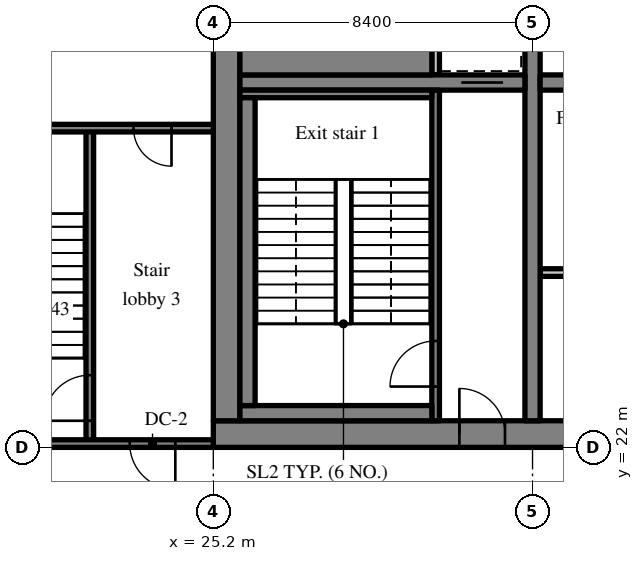
"""IFC4 building model, lengths in metres.
Left out: names, types, materials, properties, quantities, classifications, styles, units other than length and angle.
Written with IfcOpenShell. Run it as: python <this file> out.ifc"""

import sys

from ifc_helpers import new_model, si_unit, direction, frame, frame_2d, origin, place, context, subcontext, project, spatial, rectangle, extrude, source, transform, mapped, element, fill, save


model = new_model("IFC4")
c1 = context("Model", 3, precision=1e-05, world=origin(), true_north=direction((0.0, 1.0)))
c2 = subcontext(c1, "Body", "Model", "MODEL_VIEW")
j1 = project(units=[si_unit("LENGTHUNIT", "METRE"), si_unit("PLANEANGLEUNIT", "RADIAN")], contexts=[c1])
p1 = place(None, origin())
s1 = spatial("IfcSite", under=j1, at=p1, CompositionType="ELEMENT")
p2 = place(p1, origin())
s2 = spatial("IfcBuilding", under=s1, at=p2, CompositionType="ELEMENT")
p3 = place(p2, frame((0.0, 0.0, 178.2)))
s3 = spatial("IfcBuildingStorey", under=s2, at=p3, CompositionType="ELEMENT", Elevation=178.2)
m1 = source(origin(), c2, "Body", "SweptSolid", [
    extrude(rectangle(XDim=50.4, YDim=0.7, at=frame_2d((25.2, 0.0))), origin(), (0.0, 0.0, 1.0), 3.52),
])
p4 = place(p3, frame((25.2, 22.35, 0.0), z_axis=(0.0, 0.0, 1.0), x_axis=(1.0, 0.0, 0.0)))
e1 = element("IfcWall", 1, at=p4, inside=s3, PredefinedType="SHEAR", context=c2, shape_type="MappedRepresentation", body=[
    mapped(m1, transform((0.0, 0.0, 0.0), scale=1.0)),
])
m2 = source(origin(), c2, "Body", "SweptSolid", [
    extrude(rectangle(XDim=1.8, YDim=2.1, at=frame_2d((0.9, 1.05))), frame((0.0, 0.36, 0.0), z_axis=(0.0, -1.0, 0.0), x_axis=(1.0, 0.0, 0.0)), (0.0, 0.0, 1.0), 0.72),
])
p5 = place(p4, frame((15.9, 0.0, 0.0)))
e2 = element("IfcOpeningElement", 2, at=p5, cuts=e1, PredefinedType="OPENING", context=c2, shape_type="MappedRepresentation", body=[
    mapped(m2, transform((0.0, 0.0, 0.0), scale=1.0)),
])
m3 = source(origin(), c2, "Body", "SweptSolid", [
    extrude(rectangle(XDim=0.9, YDim=2.1, at=frame_2d((0.45, 1.05))), frame((0.0, 0.36, 0.0), z_axis=(0.0, -1.0, 0.0), x_axis=(1.0, 0.0, 0.0)), (0.0, 0.0, 1.0), 0.72),
])
p6 = place(p4, frame((11.2, 0.0, 0.0)))
e3 = element("IfcOpeningElement", 3, at=p6, cuts=e1, PredefinedType="OPENING", context=c2, shape_type="MappedRepresentation", body=[
    mapped(m3, transform((0.0, 0.0, 0.0), scale=1.0)),
])
p7 = place(p4, frame((21.5, 0.0, 0.0)))
e4 = element("IfcOpeningElement", 4, at=p7, cuts=e1, PredefinedType="OPENING", context=c2, shape_type="MappedRepresentation", body=[
    mapped(m3, transform((0.0, 0.0, 0.0), scale=1.0)),
])
p8 = place(p4, frame((32.7, 0.0, 0.0)))
e5 = element("IfcOpeningElement", 5, at=p8, cuts=e1, PredefinedType="OPENING", context=c2, shape_type="MappedRepresentation", body=[
    mapped(m2, transform((0.0, 0.0, 0.0), scale=1.0)),
])
m4 = source(origin(), c2, "Body", "SweptSolid", [
    extrude(rectangle(XDim=1.2, YDim=2.1, at=frame_2d((0.6, 1.05))), frame((0.0, 0.36, 0.0), z_axis=(0.0, -1.0, 0.0), x_axis=(1.0, 0.0, 0.0)), (0.0, 0.0, 1.0), 0.72),
])
p9 = place(p4, frame((6.475, 0.0, 0.0)))
e6 = element("IfcOpeningElement", 6, at=p9, cuts=e1, PredefinedType="OPENING", context=c2, shape_type="MappedRepresentation", body=[
    mapped(m4, transform((0.0, 0.0, 0.0), scale=1.0)),
])
p10 = place(p4, frame((47.875, 0.0, 0.0)))
e7 = element("IfcOpeningElement", 7, at=p10, cuts=e1, PredefinedType="OPENING", context=c2, shape_type="MappedRepresentation", body=[
    mapped(m4, transform((0.0, 0.0, 0.0), scale=1.0)),
])
m5 = source(origin(), c2, "Body", "SweptSolid", [
    extrude(rectangle(XDim=18.6, YDim=0.7, at=frame_2d((9.3, 0.0))), origin(), (0.0, 0.0, 1.0), 3.52),
])
p11 = place(p3, frame((25.55, 22.7, 0.0), z_axis=(0.0, 0.0, 1.0), x_axis=(0.0, 1.0, 0.0)))
e8 = element("IfcWall", 8, at=p11, inside=s3, PredefinedType="SHEAR", context=c2, shape_type="MappedRepresentation", body=[
    mapped(m5, transform((0.0, 0.0, 0.0), scale=1.0)),
])
m6 = source(origin(), c2, "Body", "SweptSolid", [
    extrude(rectangle(XDim=18.6, YDim=0.4, at=frame_2d((9.3, 0.0))), origin(), (0.0, 0.0, 1.0), 3.52),
])
p12 = place(p3, frame((33.6, 22.7, 0.0), z_axis=(0.0, 0.0, 1.0), x_axis=(0.0, 1.0, 0.0)))
e9 = element("IfcWall", 9, at=p12, inside=s3, PredefinedType="SHEAR", context=c2, shape_type="MappedRepresentation", body=[
    mapped(m6, transform((0.0, 0.0, 0.0), scale=1.0)),
])
m7 = source(origin(), c2, "Body", "SweptSolid", [
    extrude(rectangle(XDim=1.1, YDim=2.1, at=frame_2d((0.55, 1.05))), frame((0.0, 0.21, 0.0), z_axis=(0.0, -1.0, 0.0), x_axis=(1.0, 0.0, 0.0)), (0.0, 0.0, 1.0), 0.42),
])
p13 = place(p12, frame((12.75, 0.0, 0.0)))
e10 = element("IfcOpeningElement", 10, at=p13, cuts=e9, PredefinedType="OPENING", context=c2, shape_type="MappedRepresentation", body=[
    mapped(m7, transform((0.0, 0.0, 0.0), scale=1.0)),
])
m8 = source(origin(), c2, "Body", "SweptSolid", [
    extrude(rectangle(XDim=7.5, YDim=0.4, at=frame_2d((3.75, 0.0))), origin(), (0.0, 0.0, 1.0), 3.52),
])
p14 = place(p3, frame((25.9, 31.6, 0.0), z_axis=(0.0, 0.0, 1.0), x_axis=(1.0, 0.0, 0.0)))
e11 = element("IfcWall", 11, at=p14, inside=s3, PredefinedType="SHEAR", context=c2, shape_type="MappedRepresentation", body=[
    mapped(m8, transform((0.0, 0.0, 0.0), scale=1.0)),
])
p15 = place(p14, frame((5.825, 0.0, 0.0)))
e12 = element("IfcOpeningElement", 12, at=p15, cuts=e11, PredefinedType="OPENING", context=c2, shape_type="MappedRepresentation", body=[
    mapped(m7, transform((0.0, 0.0, 0.0), scale=1.0)),
])
m9 = source(origin(), c2, "Body", "SweptSolid", [
    extrude(rectangle(XDim=16.4, YDim=0.4, at=frame_2d((8.2, 0.0))), origin(), (0.0, 0.0, 1.0), 3.52),
])
p16 = place(p3, frame((33.8, 31.6, 0.0), z_axis=(0.0, 0.0, 1.0), x_axis=(1.0, 0.0, 0.0)))
e13 = element("IfcWall", 13, at=p16, inside=s3, PredefinedType="SHEAR", context=c2, shape_type="MappedRepresentation", body=[
    mapped(m9, transform((0.0, 0.0, 0.0), scale=1.0)),
])
m10 = source(origin(), c2, "Body", "SweptSolid", [
    extrude(rectangle(XDim=1.0, YDim=2.1, at=frame_2d((0.5, 1.05))), frame((0.0, 0.21, 0.0), z_axis=(0.0, -1.0, 0.0), x_axis=(1.0, 0.0, 0.0)), (0.0, 0.0, 1.0), 0.42),
])
p17 = place(p16, frame((14.8, 0.0, 0.0)))
e14 = element("IfcOpeningElement", 14, at=p17, cuts=e13, PredefinedType="OPENING", context=c2, shape_type="MappedRepresentation", body=[
    mapped(m10, transform((0.0, 0.0, 0.0), scale=1.0)),
])
m11 = source(origin(), c2, "Body", "SweptSolid", [
    extrude(rectangle(XDim=6.1, YDim=0.2, at=frame_2d((3.05, 0.0))), origin(), (0.0, 0.0, 1.0), 3.52),
])
p18 = place(p3, frame((33.8, 26.6, 0.0), z_axis=(0.0, 0.0, 1.0), x_axis=(1.0, 0.0, 0.0)))
e15 = element("IfcWall", 15, at=p18, inside=s3, PredefinedType="PARTITIONING", context=c2, shape_type="MappedRepresentation", body=[
    mapped(m11, transform((0.0, 0.0, 0.0), scale=1.0)),
])
m12 = source(origin(), c2, "Body", "SweptSolid", [
    extrude(rectangle(XDim=8.7, YDim=0.2, at=frame_2d((4.35, 0.0))), origin(), (0.0, 0.0, 1.0), 3.52),
])
p19 = place(p3, frame((31.05, 22.7, 0.0), z_axis=(0.0, 0.0, 1.0), x_axis=(0.0, 1.0, 0.0)))
e16 = element("IfcWall", 16, at=p19, inside=s3, PredefinedType="SOLIDWALL", context=c2, shape_type="MappedRepresentation", body=[
    mapped(m12, transform((0.0, 0.0, 0.0), scale=1.0)),
])
m13 = source(origin(), c2, "Body", "SweptSolid", [
    extrude(rectangle(XDim=1.2, YDim=2.1, at=frame_2d((0.6, 1.05))), frame((0.0, 0.11, 0.0), z_axis=(0.0, -1.0, 0.0), x_axis=(1.0, 0.0, 0.0)), (0.0, 0.0, 1.0), 0.22),
])
p20 = place(p19, frame((0.9, 0.0, 0.0)))
e17 = element("IfcOpeningElement", 17, at=p20, cuts=e16, PredefinedType="OPENING", context=c2, shape_type="MappedRepresentation", body=[
    mapped(m13, transform((0.0, 0.0, 0.0), scale=1.0)),
])
m14 = source(origin(), c2, "Body", "SweptSolid", [
    extrude(rectangle(XDim=1.8, YDim=0.2, at=frame_2d((0.9, 0.0))), origin(), (0.0, 0.0, 1.0), 3.52),
])
p21 = place(p3, frame((31.05, 31.8, 0.0), z_axis=(0.0, 0.0, 1.0), x_axis=(0.0, 1.0, 0.0)))
e18 = element("IfcWall", 18, at=p21, inside=s3, PredefinedType="SOLIDWALL", context=c2, shape_type="MappedRepresentation", body=[
    mapped(m14, transform((0.0, 0.0, 0.0), scale=1.0)),
])
m15 = source(origin(), c2, "Body", "SweptSolid", [
    extrude(rectangle(XDim=8.3, YDim=0.2, at=frame_2d((4.15, 0.0))), origin(), (0.0, 0.0, 1.0), 3.52),
])
p22 = place(p3, frame((21.95, 22.1, 0.0), z_axis=(0.0, 0.0, 1.0), x_axis=(0.0, 1.0, 0.0)))
e19 = element("IfcWall", 19, at=p22, inside=s3, PredefinedType="SOLIDWALL", context=c2, shape_type="MappedRepresentation", body=[
    mapped(m15, transform((0.0, 0.0, 0.0), scale=1.0)),
])
p23 = place(p22, frame((0.6, 0.0, 0.0)))
e20 = element("IfcOpeningElement", 20, at=p23, cuts=e19, PredefinedType="OPENING", context=c2, shape_type="MappedRepresentation", body=[
    mapped(m13, transform((0.0, 0.0, 0.0), scale=1.0)),
])
m16 = source(origin(), c2, "Body", "SweptSolid", [
    extrude(rectangle(XDim=8.25, YDim=0.2, at=frame_2d((4.125, 0.0))), origin(), (0.0, 0.0, 1.0), 3.52),
])
p24 = place(p3, frame((16.95, 22.1, 0.0), z_axis=(0.0, 0.0, 1.0), x_axis=(1.0, 0.0, 0.0)))
e21 = element("IfcWall", 21, at=p24, inside=s3, PredefinedType="SOLIDWALL", context=c2, shape_type="MappedRepresentation", body=[
    mapped(m16, transform((0.0, 0.0, 0.0), scale=1.0)),
])
p25 = place(p24, frame((6.05, 0.0, 0.0)))
e22 = element("IfcOpeningElement", 22, at=p25, cuts=e21, PredefinedType="OPENING", context=c2, shape_type="MappedRepresentation", body=[
    mapped(m13, transform((0.0, 0.0, 0.0), scale=1.0)),
])
p26 = place(p3, frame((16.95, 30.4, 0.0), z_axis=(0.0, 0.0, 1.0), x_axis=(1.0, 0.0, 0.0)))
e23 = element("IfcWall", 23, at=p26, inside=s3, PredefinedType="SOLIDWALL", context=c2, shape_type="MappedRepresentation", body=[
    mapped(m16, transform((0.0, 0.0, 0.0), scale=1.0)),
])
m17 = source(origin(), c2, "Body", "SweptSolid", [
    extrude(rectangle(XDim=1.0, YDim=2.1, at=frame_2d((0.5, 1.05))), frame((0.0, 0.11, 0.0), z_axis=(0.0, -1.0, 0.0), x_axis=(1.0, 0.0, 0.0)), (0.0, 0.0, 1.0), 0.22),
])
p27 = place(p26, frame((6.15, 0.0, 0.0)))
e24 = element("IfcOpeningElement", 24, at=p27, cuts=e23, PredefinedType="OPENING", context=c2, shape_type="MappedRepresentation", body=[
    mapped(m17, transform((0.0, 0.0, 0.0), scale=1.0)),
])
m18 = source(origin(), c2, "Body", "SweptSolid", [
    extrude(rectangle(XDim=5.05, YDim=0.4, at=frame_2d((2.525, 0.0))), origin(), (0.0, 0.0, 1.0), 3.52),
])
p28 = place(p3, frame((25.9, 22.9, 0.0), z_axis=(0.0, 0.0, 1.0), x_axis=(1.0, 0.0, 0.0)))
e25 = element("IfcWall", 25, at=p28, inside=s3, PredefinedType="SOLIDWALL", context=c2, shape_type="MappedRepresentation", body=[
    mapped(m18, transform((0.0, 0.0, 0.0), scale=1.0)),
])
m19 = source(origin(), c2, "Body", "SweptSolid", [
    extrude(rectangle(XDim=5.05, YDim=0.2, at=frame_2d((2.525, 0.0))), origin(), (0.0, 0.0, 1.0), 3.52),
])
p29 = place(p3, frame((25.9, 31.3, 0.0), z_axis=(0.0, 0.0, 1.0), x_axis=(1.0, 0.0, 0.0)))
e26 = element("IfcWall", 26, at=p29, inside=s3, PredefinedType="SOLIDWALL", context=c2, shape_type="MappedRepresentation", body=[
    mapped(m19, transform((0.0, 0.0, 0.0), scale=1.0)),
])
m20 = source(origin(), c2, "Body", "SweptSolid", [
    extrude(rectangle(XDim=8.1, YDim=0.4, at=frame_2d((4.05, 0.0))), origin(), (0.0, 0.0, 1.0), 3.52),
])
p30 = place(p3, frame((26.1, 23.1, 0.0), z_axis=(0.0, 0.0, 1.0), x_axis=(0.0, 1.0, 0.0)))
e27 = element("IfcWall", 27, at=p30, inside=s3, PredefinedType="SOLIDWALL", context=c2, shape_type="MappedRepresentation", body=[
    mapped(m20, transform((0.0, 0.0, 0.0), scale=1.0)),
])
m21 = source(origin(), c2, "Body", "SweptSolid", [
    extrude(rectangle(XDim=5.05, YDim=1.0, at=frame_2d((2.525, 0.0))), origin(), (0.0, 0.0, 1.0), 3.52),
])
p31 = place(p3, frame((25.9, 32.3, 0.0), z_axis=(0.0, 0.0, 1.0), x_axis=(1.0, 0.0, 0.0)))
e28 = element("IfcWall", 28, at=p31, inside=s3, PredefinedType="SOLIDWALL", context=c2, shape_type="MappedRepresentation", body=[
    mapped(m21, transform((0.0, 0.0, 0.0), scale=1.0)),
])
m22 = source(origin(), c2, "Body", "SweptSolid", [
    extrude(rectangle(XDim=1.2, YDim=2.1, at=frame_2d((0.6, 1.05))), frame((0.0, 0.025, 0.0), z_axis=(0.0, -1.0, 0.0), x_axis=(1.0, 0.0, 0.0)), (0.0, 0.0, 1.0), 0.05),
])
p32 = place(p20, origin())
e29 = element("IfcDoor", 29, at=p32, inside=s3, OperationType="SINGLE_SWING_LEFT", PredefinedType="DOOR", context=c2, shape_type="MappedRepresentation", body=[
    mapped(m22, transform((0.0, 0.0, 0.0), scale=1.0)),
])
fill(e17, e29)
m23 = source(origin(), c2, "Body", "SweptSolid", [
    extrude(rectangle(XDim=1.2, YDim=2.1, at=frame_2d((0.6, 1.05))), frame((0.0, 0.275, 0.0), z_axis=(0.0, -1.0, 0.0), x_axis=(1.0, 0.0, 0.0)), (0.0, 0.0, 1.0), 0.05),
])
p33 = place(p9, origin())
e30 = element("IfcDoor", 30, at=p33, inside=s3, OperationType="SINGLE_SWING_LEFT", PredefinedType="DOOR", context=c2, shape_type="MappedRepresentation", body=[
    mapped(m23, transform((0.0, 0.0, 0.0), scale=1.0)),
])
fill(e6, e30)
m24 = source(origin(), c2, "Body", "SweptSolid", [
    extrude(rectangle(XDim=1.1, YDim=2.1, at=frame_2d((0.55, 1.05))), frame((0.0, 0.025, 0.0), z_axis=(0.0, -1.0, 0.0), x_axis=(1.0, 0.0, 0.0)), (0.0, 0.0, 1.0), 0.05),
])
p34 = place(p15, origin())
e31 = element("IfcDoor", 31, at=p34, inside=s3, OperationType="SLIDING_TO_LEFT", PredefinedType="DOOR", context=c2, shape_type="MappedRepresentation", body=[
    mapped(m24, transform((0.0, 0.0, 0.0), scale=1.0)),
])
fill(e12, e31)
p35 = place(p23, origin())
e32 = element("IfcDoor", 32, at=p35, inside=s3, OperationType="SINGLE_SWING_LEFT", PredefinedType="DOOR", context=c2, shape_type="MappedRepresentation", body=[
    mapped(m22, transform((0.0, 0.0, 0.0), scale=1.0)),
])
fill(e20, e32)
p36 = place(p25, origin())
e33 = element("IfcDoor", 33, at=p36, inside=s3, OperationType="SINGLE_SWING_RIGHT", PredefinedType="DOOR", context=c2, shape_type="MappedRepresentation", body=[
    mapped(m22, transform((0.0, 0.0, 0.0), scale=1.0)),
])
fill(e22, e33)
m25 = source(origin(), c2, "Body", "SweptSolid", [
    extrude(rectangle(XDim=1.0, YDim=2.1, at=frame_2d((0.5, 1.05))), frame((0.0, 0.025, 0.0), z_axis=(0.0, -1.0, 0.0), x_axis=(1.0, 0.0, 0.0)), (0.0, 0.0, 1.0), 0.05),
])
p37 = place(p27, origin())
e34 = element("IfcDoor", 34, at=p37, inside=s3, OperationType="SINGLE_SWING_RIGHT", PredefinedType="DOOR", context=c2, shape_type="MappedRepresentation", body=[
    mapped(m25, transform((0.0, 0.0, 0.0), scale=1.0)),
])
fill(e24, e34)
save(model, sys.argv[1])
